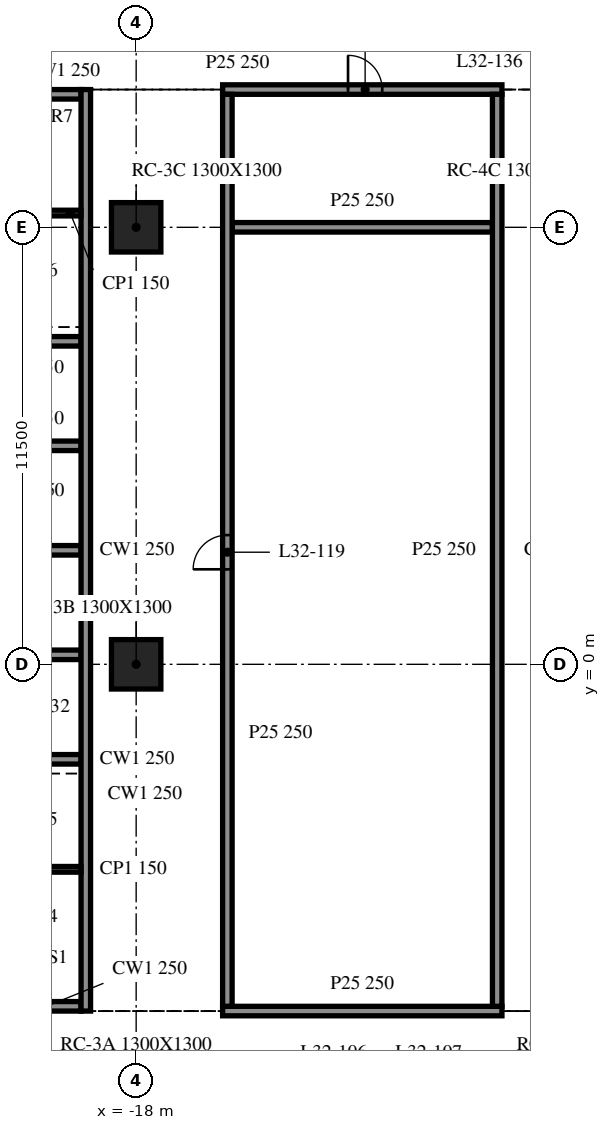
"""IFC4 building model, lengths in metres.
Left out: names, types, materials, properties, quantities, classifications, styles, units other than length and angle.
Written with IfcOpenShell. Run it as: python <this file> out.ifc"""

import sys

from ifc_helpers import new_model, si_unit, direction, frame, frame_2d, origin, origin_2d, place, context, subcontext, project, spatial, rectangle, extrude, element, fill, save


model = new_model("IFC4")
c1 = context("Model", 3, precision=1e-05, world=origin(), true_north=direction((0.0, 1.0)))
c2 = subcontext(c1, "Body", "Model", "MODEL_VIEW")
j1 = project(units=[si_unit("LENGTHUNIT", "METRE"), si_unit("PLANEANGLEUNIT", "RADIAN")], contexts=[c1])
p1 = place(None, origin())
s1 = spatial("IfcSite", under=j1, at=p1, CompositionType="ELEMENT")
p2 = place(p1, origin())
s2 = spatial("IfcBuilding", under=s1, at=p2, CompositionType="ELEMENT")
p3 = place(p2, frame((0.0, 0.0, 138.4)))
s3 = spatial("IfcBuildingStorey", under=s2, at=p3, CompositionType="ELEMENT", Elevation=138.4)
for number, where, z_axis, x_axis in (
    (1, (-18.0, 0.0, -0.34), (0.0, 0.0, 1.0), (1.0, 0.0, 0.0)),
    (2, (-18.0, 11.5, -0.34), (0.0, 0.0, 1.0), (1.0, 0.0, 0.0)),
):
    element("IfcColumn", number, at=place(p3, frame(where, z_axis=z_axis, x_axis=x_axis)), inside=s3, PredefinedType="COLUMN", context=c2, shape_type="SweptSolid", body=[
        extrude(rectangle(XDim=1.3, YDim=1.3, at=origin_2d()), origin(), (0.0, 0.0, 1.0), 4.1),
    ])
p4 = place(p3, frame((-19.325, -9.125, 0.0), z_axis=(0.0, 0.0, 1.0), x_axis=(0.0, 1.0, 0.0)))
e3 = element("IfcWall", 3, at=p4, inside=s3, PredefinedType="SOLIDWALL", context=c2, shape_type="SweptSolid", body=[
    extrude(rectangle(XDim=24.25, YDim=0.25, at=frame_2d((12.125, 0.0))), origin(), (0.0, 0.0, 1.0), 3.76),
])
p5 = place(p3, frame((-19.45, -9.0, 0.0), z_axis=(0.0, 0.0, 1.0), x_axis=(-1.0, 0.0, 0.0)))
e4 = element("IfcWall", 4, at=p5, inside=s3, PredefinedType="SOLIDWALL", context=c2, shape_type="SweptSolid", body=[
    extrude(rectangle(XDim=9.1, YDim=0.25, at=frame_2d((4.55, 0.0))), origin(), (0.0, 0.0, 1.0), 3.76),
])
p6 = place(p5, frame((3.65, 0.0, 0.0)))
e5 = element("IfcOpeningElement", 5, at=p6, cuts=e4, PredefinedType="OPENING", context=c2, shape_type="SweptSolid", body=[
    extrude(rectangle(XDim=1.8, YDim=2.1, at=frame_2d((0.9, 1.05))), frame((0.0, 0.135, 0.0), z_axis=(0.0, -1.0, 0.0), x_axis=(1.0, 0.0, 0.0)), (0.0, 0.0, 1.0), 0.27),
])
p7 = place(p3, frame((-28.55, 15.0, 0.0), z_axis=(0.0, 0.0, 1.0), x_axis=(1.0, 0.0, 0.0)))
e6 = element("IfcWall", 6, at=p7, inside=s3, PredefinedType="SOLIDWALL", context=c2, shape_type="SweptSolid", body=[
    extrude(rectangle(XDim=9.1, YDim=0.25, at=frame_2d((4.55, 0.0))), origin(), (0.0, 0.0, 1.0), 3.76),
])
p8 = place(p7, frame((3.65, 0.0, 0.0)))
e7 = element("IfcOpeningElement", 7, at=p8, cuts=e6, PredefinedType="OPENING", context=c2, shape_type="SweptSolid", body=[
    extrude(rectangle(XDim=1.8, YDim=2.1, at=frame_2d((0.9, 1.05))), frame((0.0, 0.135, 0.0), z_axis=(0.0, -1.0, 0.0), x_axis=(1.0, 0.0, 0.0)), (0.0, 0.0, 1.0), 0.27),
])
for number, where, z_axis, x_axis in (
    (8, (-22.3, -2.5, 0.0), (0.0, 0.0, 1.0), (1.0, 0.0, 0.0)),
    (9, (-22.3, 0.25, 0.0), (0.0, 0.0, 1.0), (1.0, 0.0, 0.0)),
    (10, (-22.3, 3.0, 0.0), (0.0, 0.0, 1.0), (1.0, 0.0, 0.0)),
    (11, (-22.3, 5.75, 0.0), (0.0, 0.0, 1.0), (1.0, 0.0, 0.0)),
    (12, (-22.3, 8.5, 0.0), (0.0, 0.0, 1.0), (1.0, 0.0, 0.0)),
):
    element("IfcWall", number, at=place(p3, frame(where, z_axis=z_axis, x_axis=x_axis)), inside=s3, PredefinedType="SOLIDWALL", context=c2, shape_type="SweptSolid", body=[
        extrude(rectangle(XDim=2.85, YDim=0.25, at=frame_2d((1.425, 0.0))), origin(), (0.0, 0.0, 1.0), 3.76),
    ])
for number, where, z_axis, x_axis in (
    (13, (-22.3, -5.395, 0.0), (0.0, 0.0, 1.0), (1.0, 0.0, 0.0)),
    (14, (-22.3, 11.875, 0.0), (0.0, 0.0, 1.0), (1.0, 0.0, 0.0)),
):
    element("IfcWall", number, at=place(p3, frame(where, z_axis=z_axis, x_axis=x_axis)), inside=s3, PredefinedType="PARTITIONING", context=c2, shape_type="SweptSolid", body=[
        extrude(rectangle(XDim=2.85, YDim=0.15, at=frame_2d((1.425, 0.0))), origin(), (0.0, 0.0, 1.0), 3.76),
    ])
p9 = place(p3, frame((-15.725, -9.125, 0.0), z_axis=(0.0, 0.0, 1.0), x_axis=(1.0, 0.0, 0.0)))
e15 = element("IfcWall", 15, at=p9, inside=s3, PredefinedType="PARTITIONING", context=c2, shape_type="SweptSolid", body=[
    extrude(rectangle(XDim=7.35, YDim=0.25, at=frame_2d((3.675, 0.0))), origin(), (0.0, 0.0, 1.0), 3.76),
])
p10 = place(p3, frame((-15.475, 11.5, 0.0), z_axis=(0.0, 0.0, 1.0), x_axis=(1.0, 0.0, 0.0)))
e16 = element("IfcWall", 16, at=p10, inside=s3, PredefinedType="PARTITIONING", context=c2, shape_type="SweptSolid", body=[
    extrude(rectangle(XDim=6.85, YDim=0.25, at=frame_2d((3.425, 0.0))), origin(), (0.0, 0.0, 1.0), 3.76),
])
p11 = place(p3, frame((-15.725, 15.125, 0.0), z_axis=(0.0, 0.0, 1.0), x_axis=(1.0, 0.0, 0.0)))
e17 = element("IfcWall", 17, at=p11, inside=s3, PredefinedType="PARTITIONING", context=c2, shape_type="SweptSolid", body=[
    extrude(rectangle(XDim=7.35, YDim=0.25, at=frame_2d((3.675, 0.0))), origin(), (0.0, 0.0, 1.0), 3.76),
])
p12 = place(p11, frame((3.3, 0.0, 0.0)))
e18 = element("IfcOpeningElement", 18, at=p12, cuts=e17, PredefinedType="OPENING", context=c2, shape_type="SweptSolid", body=[
    extrude(rectangle(XDim=0.9, YDim=2.1, at=frame_2d((0.45, 1.05))), frame((0.0, 0.135, 0.0), z_axis=(0.0, -1.0, 0.0), x_axis=(1.0, 0.0, 0.0)), (0.0, 0.0, 1.0), 0.27),
])
p13 = place(p3, frame((-15.6, -9.0, 0.0), z_axis=(0.0, 0.0, 1.0), x_axis=(0.0, 1.0, 0.0)))
e19 = element("IfcWall", 19, at=p13, inside=s3, PredefinedType="PARTITIONING", context=c2, shape_type="SweptSolid", body=[
    extrude(rectangle(XDim=24.0, YDim=0.25, at=frame_2d((12.0, 0.0))), origin(), (0.0, 0.0, 1.0), 3.76),
])
p14 = place(p13, frame((11.5, 0.0, 0.0)))
e20 = element("IfcOpeningElement", 20, at=p14, cuts=e19, PredefinedType="OPENING", context=c2, shape_type="SweptSolid", body=[
    extrude(rectangle(XDim=0.9, YDim=2.1, at=frame_2d((0.45, 1.05))), frame((0.0, 0.135, 0.0), z_axis=(0.0, -1.0, 0.0), x_axis=(1.0, 0.0, 0.0)), (0.0, 0.0, 1.0), 0.27),
])
p15 = place(p3, frame((-8.5, -9.0, 0.0), z_axis=(0.0, 0.0, 1.0), x_axis=(0.0, 1.0, 0.0)))
e21 = element("IfcWall", 21, at=p15, inside=s3, PredefinedType="PARTITIONING", context=c2, shape_type="SweptSolid", body=[
    extrude(rectangle(XDim=24.0, YDim=0.25, at=frame_2d((12.0, 0.0))), origin(), (0.0, 0.0, 1.0), 3.76),
])
p16 = place(p14, origin())
e22 = element("IfcDoor", 22, at=p16, inside=s3, OperationType="SINGLE_SWING_RIGHT", PredefinedType="DOOR", context=c2, shape_type="SweptSolid", body=[
    extrude(rectangle(XDim=0.9, YDim=2.1, at=frame_2d((0.45, 1.05))), frame((0.0, 0.025, 0.0), z_axis=(0.0, -1.0, 0.0), x_axis=(1.0, 0.0, 0.0)), (0.0, 0.0, 1.0), 0.05),
])
fill(e20, e22)
p17 = place(p12, origin())
e23 = element("IfcDoor", 23, at=p17, inside=s3, OperationType="SINGLE_SWING_LEFT", PredefinedType="DOOR", context=c2, shape_type="SweptSolid", body=[
    extrude(rectangle(XDim=0.9, YDim=2.1, at=frame_2d((0.45, 1.05))), frame((0.0, 0.025, 0.0), z_axis=(0.0, -1.0, 0.0), x_axis=(1.0, 0.0, 0.0)), (0.0, 0.0, 1.0), 0.05),
])
fill(e18, e23)
save(model, sys.argv[1])
